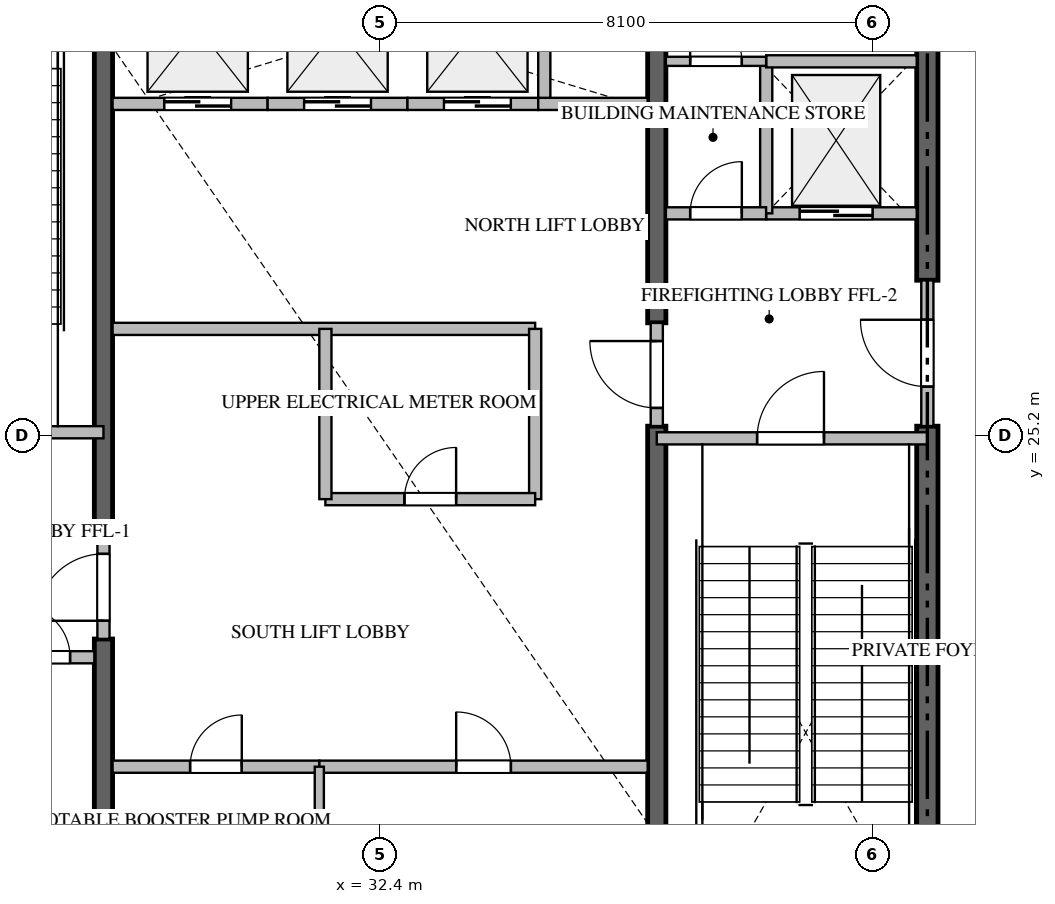
"""IFC4 building model, lengths in metres.
Left out: names, types, materials, properties, quantities, classifications, styles, units other than length and angle.
Written with IfcOpenShell. Run it as: python <this file> out.ifc"""

import sys

from ifc_helpers import new_model, si_unit, direction, frame, frame_2d, origin, place, context, subcontext, project, spatial, rectangle, extrude, source, transform, mapped, element, fill, save


model = new_model("IFC4")
c1 = context("Model", 3, precision=1e-05, world=origin(), true_north=direction((0.0, 1.0)))
c2 = subcontext(c1, "Body", "Model", "MODEL_VIEW")
j1 = project(units=[si_unit("LENGTHUNIT", "METRE"), si_unit("PLANEANGLEUNIT", "RADIAN")], contexts=[c1])
p1 = place(None, origin())
s1 = spatial("IfcSite", under=j1, at=p1, CompositionType="ELEMENT")
p2 = place(p1, origin())
s2 = spatial("IfcBuilding", under=s1, at=p2, CompositionType="ELEMENT")
p3 = place(p2, frame((0.0, 0.0, 342.05)))
s3 = spatial("IfcBuildingStorey", under=s2, at=p3, CompositionType="ELEMENT", Elevation=342.05)
p4 = place(p3, frame((41.4, 16.975, -0.26), z_axis=(0.0, 0.0, 1.0), x_axis=(0.0, 1.0, 0.0)))
e1 = element("IfcWall", 1, at=p4, inside=s3, PredefinedType="SHEAR", context=c2, shape_type="SweptSolid", body=[
    extrude(rectangle(XDim=8.375, YDim=0.35, at=frame_2d((4.188, 0.0))), origin(), (0.0, 0.0, 1.0), 5.898),
])
p5 = place(p3, frame((41.4, 27.75, -0.26), z_axis=(0.0, 0.0, 1.0), x_axis=(0.0, 1.0, 0.0)))
e2 = element("IfcWall", 2, at=p5, inside=s3, PredefinedType="SHEAR", context=c2, shape_type="SweptSolid", body=[
    extrude(rectangle(XDim=5.675, YDim=0.35, at=frame_2d((2.837, 0.0))), origin(), (0.0, 0.0, 1.0), 5.898),
])
p6 = place(p3, frame((27.85, 16.975, -0.26), z_axis=(0.0, 0.0, 1.0), x_axis=(0.0, 1.0, 0.0)))
e3 = element("IfcWall", 3, at=p6, inside=s3, PredefinedType="SHEAR", context=c2, shape_type="SweptSolid", body=[
    extrude(rectangle(XDim=4.875, YDim=0.3, at=frame_2d((2.438, 0.0))), origin(), (0.0, 0.0, 1.0), 5.898),
])
p7 = place(p3, frame((27.85, 23.55, -0.26), z_axis=(0.0, 0.0, 1.0), x_axis=(0.0, 1.0, 0.0)))
e4 = element("IfcWall", 4, at=p7, inside=s3, PredefinedType="SHEAR", context=c2, shape_type="SweptSolid", body=[
    extrude(rectangle(XDim=9.875, YDim=0.3, at=frame_2d((4.938, 0.0))), origin(), (0.0, 0.0, 1.0), 5.898),
])
p8 = place(p3, frame((36.95, 16.975, -0.26), z_axis=(0.0, 0.0, 1.0), x_axis=(0.0, 1.0, 0.0)))
e5 = element("IfcWall", 5, at=p8, inside=s3, PredefinedType="SHEAR", context=c2, shape_type="SweptSolid", body=[
    extrude(rectangle(XDim=8.375, YDim=0.3, at=frame_2d((4.188, 0.0))), origin(), (0.0, 0.0, 1.0), 5.898),
])
p9 = place(p3, frame((36.95, 27.05, -0.26), z_axis=(0.0, 0.0, 1.0), x_axis=(0.0, 1.0, 0.0)))
e6 = element("IfcWall", 6, at=p9, inside=s3, PredefinedType="SHEAR", context=c2, shape_type="SweptSolid", body=[
    extrude(rectangle(XDim=6.375, YDim=0.3, at=frame_2d((3.188, 0.0))), origin(), (0.0, 0.0, 1.0), 5.898),
])
p10 = place(p3, frame((23.4, 25.25, 0.0), z_axis=(0.0, 0.0, 1.0), x_axis=(1.0, 0.0, 0.0)))
e7 = element("IfcWall", 7, at=p10, inside=s3, PredefinedType="STANDARD", context=c2, shape_type="SweptSolid", body=[
    extrude(rectangle(XDim=4.45, YDim=0.2, at=frame_2d((2.225, 0.0))), origin(), (0.0, 0.0, 1.0), 5.64),
])
p11 = place(p10, frame((1.65, 0.0, 0.0)))
e8 = element("IfcOpeningElement", 8, at=p11, cuts=e7, PredefinedType="OPENING", context=c2, shape_type="SweptSolid", body=[
    extrude(rectangle(XDim=1.1, YDim=2.15, at=frame_2d((0.55, 1.075))), frame((0.0, 0.11, 0.0), z_axis=(0.0, -1.0, 0.0), x_axis=(1.0, 0.0, 0.0)), (0.0, 0.0, 1.0), 0.22),
])
p12 = place(p3, frame((36.95, 25.15, 0.0), z_axis=(0.0, 0.0, 1.0), x_axis=(1.0, 0.0, 0.0)))
e9 = element("IfcWall", 9, at=p12, inside=s3, PredefinedType="STANDARD", context=c2, shape_type="SweptSolid", body=[
    extrude(rectangle(XDim=4.45, YDim=0.2, at=frame_2d((2.225, 0.0))), origin(), (0.0, 0.0, 1.0), 5.64),
])
p13 = place(p12, frame((1.65, 0.0, 0.0)))
e10 = element("IfcOpeningElement", 10, at=p13, cuts=e9, PredefinedType="OPENING", context=c2, shape_type="SweptSolid", body=[
    extrude(rectangle(XDim=1.1, YDim=2.15, at=frame_2d((0.55, 1.075))), frame((0.0, 0.11, 0.0), z_axis=(0.0, -1.0, 0.0), x_axis=(1.0, 0.0, 0.0)), (0.0, 0.0, 1.0), 0.22),
])
p14 = place(p3, frame((38.75, 28.85, 0.0), z_axis=(0.0, 0.0, 1.0), x_axis=(1.0, 0.0, 0.0)))
e11 = element("IfcWall", 11, at=p14, inside=s3, PredefinedType="STANDARD", context=c2, shape_type="SweptSolid", body=[
    extrude(rectangle(XDim=2.475, YDim=0.2, at=frame_2d((1.238, 0.0))), origin(), (0.0, 0.0, 1.0), 5.64),
])
p15 = place(p14, frame((0.55, 0.0, 0.0)))
e12 = element("IfcOpeningElement", 12, at=p15, cuts=e11, PredefinedType="OPENING", context=c2, shape_type="SweptSolid", body=[
    extrude(rectangle(XDim=1.2, YDim=2.2, at=frame_2d((0.6, 1.1))), frame((0.0, 0.11, 0.0), z_axis=(0.0, -1.0, 0.0), x_axis=(1.0, 0.0, 0.0)), (0.0, 0.0, 1.0), 0.22),
])
p16 = place(p3, frame((28.0, 30.65, 0.0), z_axis=(0.0, 0.0, 1.0), x_axis=(1.0, 0.0, 0.0)))
e13 = element("IfcWall", 13, at=p16, inside=s3, PredefinedType="STANDARD", context=c2, shape_type="SweptSolid", body=[
    extrude(rectangle(XDim=2.55, YDim=0.2, at=frame_2d((1.275, 0.0))), origin(), (0.0, 0.0, 1.0), 5.64),
])
p17 = place(p16, frame((0.85, 0.0, 0.0)))
e14 = element("IfcOpeningElement", 14, at=p17, cuts=e13, PredefinedType="OPENING", context=c2, shape_type="SweptSolid", body=[
    extrude(rectangle(XDim=1.1, YDim=2.2, at=frame_2d((0.55, 1.1))), frame((0.0, 0.11, 0.0), z_axis=(0.0, -1.0, 0.0), x_axis=(1.0, 0.0, 0.0)), (0.0, 0.0, 1.0), 0.22),
])
p18 = place(p3, frame((30.55, 30.65, 0.0), z_axis=(0.0, 0.0, 1.0), x_axis=(1.0, 0.0, 0.0)))
e15 = element("IfcWall", 15, at=p18, inside=s3, PredefinedType="STANDARD", context=c2, shape_type="SweptSolid", body=[
    extrude(rectangle(XDim=2.3, YDim=0.2, at=frame_2d((1.15, 0.0))), origin(), (0.0, 0.0, 1.0), 5.64),
])
p19 = place(p18, frame((0.6, 0.0, 0.0)))
e16 = element("IfcOpeningElement", 16, at=p19, cuts=e15, PredefinedType="OPENING", context=c2, shape_type="SweptSolid", body=[
    extrude(rectangle(XDim=1.1, YDim=2.2, at=frame_2d((0.55, 1.1))), frame((0.0, 0.11, 0.0), z_axis=(0.0, -1.0, 0.0), x_axis=(1.0, 0.0, 0.0)), (0.0, 0.0, 1.0), 0.22),
])
p20 = place(p3, frame((32.85, 30.65, 0.0), z_axis=(0.0, 0.0, 1.0), x_axis=(1.0, 0.0, 0.0)))
e17 = element("IfcWall", 17, at=p20, inside=s3, PredefinedType="STANDARD", context=c2, shape_type="SweptSolid", body=[
    extrude(rectangle(XDim=2.15, YDim=0.2, at=frame_2d((1.075, 0.0))), origin(), (0.0, 0.0, 1.0), 5.64),
])
p21 = place(p20, frame((0.6, 0.0, 0.0)))
e18 = element("IfcOpeningElement", 18, at=p21, cuts=e17, PredefinedType="OPENING", context=c2, shape_type="SweptSolid", body=[
    extrude(rectangle(XDim=1.1, YDim=2.2, at=frame_2d((0.55, 1.1))), frame((0.0, 0.11, 0.0), z_axis=(0.0, -1.0, 0.0), x_axis=(1.0, 0.0, 0.0)), (0.0, 0.0, 1.0), 0.22),
])
p22 = place(p3, frame((35.0, 30.65, 0.0), z_axis=(0.0, 0.0, 1.0), x_axis=(1.0, 0.0, 0.0)))
e19 = element("IfcWall", 19, at=p22, inside=s3, PredefinedType="STANDARD", context=c2, shape_type="SweptSolid", body=[
    extrude(rectangle(XDim=1.8, YDim=0.2, at=frame_2d((0.9, 0.0))), origin(), (0.0, 0.0, 1.0), 5.64),
])
p23 = place(p3, frame((35.1, 30.75, 0.0), z_axis=(0.0, 0.0, 1.0), x_axis=(0.0, 1.0, 0.0)))
e20 = element("IfcWall", 20, at=p23, inside=s3, PredefinedType="STANDARD", context=c2, shape_type="SweptSolid", body=[
    extrude(rectangle(XDim=2.675, YDim=0.2, at=frame_2d((1.337, 0.0))), origin(), (0.0, 0.0, 1.0), 5.64),
])
p24 = place(p3, frame((26.052, 21.55, 0.0), z_axis=(0.0, 0.0, 1.0), x_axis=(1.0, 0.0, 0.0)))
e21 = element("IfcWall", 21, at=p24, inside=s3, PredefinedType="STANDARD", context=c2, shape_type="SweptSolid", body=[
    extrude(rectangle(XDim=1.648, YDim=0.2, at=frame_2d((0.824, 0.0))), origin(), (0.0, 0.0, 1.0), 5.64),
])
p25 = place(p24, frame((0.399, 0.0, 0.0)))
e22 = element("IfcOpeningElement", 22, at=p25, cuts=e21, PredefinedType="OPENING", context=c2, shape_type="SweptSolid", body=[
    extrude(rectangle(XDim=0.85, YDim=2.1, at=frame_2d((0.425, 1.05))), frame((0.0, 0.11, 0.0), z_axis=(0.0, -1.0, 0.0), x_axis=(1.0, 0.0, 0.0)), (0.0, 0.0, 1.0), 0.22),
])
p26 = place(p3, frame((38.75, 28.85, 0.0), z_axis=(0.0, 0.0, 1.0), x_axis=(0.0, 1.0, 0.0)))
e23 = element("IfcWall", 23, at=p26, inside=s3, PredefinedType="STANDARD", context=c2, shape_type="SweptSolid", body=[
    extrude(rectangle(XDim=2.5, YDim=0.2, at=frame_2d((1.25, 0.0))), origin(), (0.0, 0.0, 1.0), 5.64),
])
p27 = place(p3, frame((38.75, 31.35, 0.0), z_axis=(0.0, 0.0, 1.0), x_axis=(1.0, 0.0, 0.0)))
e24 = element("IfcWall", 24, at=p27, inside=s3, PredefinedType="STANDARD", context=c2, shape_type="SweptSolid", body=[
    extrude(rectangle(XDim=2.475, YDim=0.2, at=frame_2d((1.238, 0.0))), origin(), (0.0, 0.0, 1.0), 5.64),
])
p28 = place(p3, frame((37.1, 28.85, 0.0), z_axis=(0.0, 0.0, 1.0), x_axis=(1.0, 0.0, 0.0)))
e25 = element("IfcWall", 25, at=p28, inside=s3, PredefinedType="STANDARD", context=c2, shape_type="SweptSolid", body=[
    extrude(rectangle(XDim=1.648, YDim=0.2, at=frame_2d((0.824, 0.0))), origin(), (0.0, 0.0, 1.0), 5.64),
])
p29 = place(p28, frame((0.399, 0.0, 0.0)))
e26 = element("IfcOpeningElement", 26, at=p29, cuts=e25, PredefinedType="OPENING", context=c2, shape_type="SweptSolid", body=[
    extrude(rectangle(XDim=0.85, YDim=2.1, at=frame_2d((0.425, 1.05))), frame((0.0, 0.11, 0.0), z_axis=(0.0, -1.0, 0.0), x_axis=(1.0, 0.0, 0.0)), (0.0, 0.0, 1.0), 0.22),
])
p30 = place(p3, frame((41.4, 25.352, 0.0), z_axis=(0.0, 0.0, 1.0), x_axis=(0.0, 1.0, 0.0)))
e27 = element("IfcWall", 27, at=p30, inside=s3, PredefinedType="STANDARD", context=c2, shape_type="SweptSolid", body=[
    extrude(rectangle(XDim=2.396, YDim=0.2, at=frame_2d((1.198, 0.0))), origin(), (0.0, 0.0, 1.0), 5.64),
])
p31 = place(p30, frame((0.648, 0.0, 0.0)))
e28 = element("IfcOpeningElement", 28, at=p31, cuts=e27, PredefinedType="OPENING", context=c2, shape_type="SweptSolid", body=[
    extrude(rectangle(XDim=1.1, YDim=2.15, at=frame_2d((0.55, 1.075))), frame((0.0, 0.11, 0.0), z_axis=(0.0, -1.0, 0.0), x_axis=(1.0, 0.0, 0.0)), (0.0, 0.0, 1.0), 0.22),
])
p32 = place(p3, frame((27.85, 21.852, 0.0), z_axis=(0.0, 0.0, 1.0), x_axis=(0.0, 1.0, 0.0)))
e29 = element("IfcWall", 29, at=p32, inside=s3, PredefinedType="STANDARD", context=c2, shape_type="SweptSolid", body=[
    extrude(rectangle(XDim=1.696, YDim=0.2, at=frame_2d((0.848, 0.0))), origin(), (0.0, 0.0, 1.0), 5.64),
])
p33 = place(p32, frame((0.298, 0.0, 0.0)))
e30 = element("IfcOpeningElement", 30, at=p33, cuts=e29, PredefinedType="OPENING", context=c2, shape_type="SweptSolid", body=[
    extrude(rectangle(XDim=1.1, YDim=2.15, at=frame_2d((0.55, 1.075))), frame((0.0, 0.11, 0.0), z_axis=(0.0, -1.0, 0.0), x_axis=(1.0, 0.0, 0.0)), (0.0, 0.0, 1.0), 0.22),
])
p34 = place(p3, frame((36.95, 25.352, 0.0), z_axis=(0.0, 0.0, 1.0), x_axis=(0.0, 1.0, 0.0)))
e31 = element("IfcWall", 31, at=p34, inside=s3, PredefinedType="STANDARD", context=c2, shape_type="SweptSolid", body=[
    extrude(rectangle(XDim=1.696, YDim=0.2, at=frame_2d((0.848, 0.0))), origin(), (0.0, 0.0, 1.0), 5.64),
])
p35 = place(p34, frame((0.298, 0.0, 0.0)))
e32 = element("IfcOpeningElement", 32, at=p35, cuts=e31, PredefinedType="OPENING", context=c2, shape_type="SweptSolid", body=[
    extrude(rectangle(XDim=1.1, YDim=2.15, at=frame_2d((0.55, 1.075))), frame((0.0, 0.11, 0.0), z_axis=(0.0, -1.0, 0.0), x_axis=(1.0, 0.0, 0.0)), (0.0, 0.0, 1.0), 0.22),
])
p36 = place(p3, frame((37.1, 31.35, 0.0), z_axis=(0.0, 0.0, 1.0), x_axis=(1.0, 0.0, 0.0)))
e33 = element("IfcWall", 33, at=p36, inside=s3, PredefinedType="PARTITIONING", context=c2, shape_type="SweptSolid", body=[
    extrude(rectangle(XDim=1.648, YDim=0.15, at=frame_2d((0.824, 0.0))), origin(), (0.0, 0.0, 1.0), 5.64),
])
p37 = place(p36, frame((0.399, 0.0, 0.0)))
e34 = element("IfcOpeningElement", 34, at=p37, cuts=e33, PredefinedType="OPENING", context=c2, shape_type="SweptSolid", body=[
    extrude(rectangle(XDim=0.85, YDim=2.1, at=frame_2d((0.425, 1.05))), frame((0.0, 0.085, 0.0), z_axis=(0.0, -1.0, 0.0), x_axis=(1.0, 0.0, 0.0)), (0.0, 0.0, 1.0), 0.17),
])
p38 = place(p3, frame((28.0, 19.75, 0.0), z_axis=(0.0, 0.0, 1.0), x_axis=(1.0, 0.0, 0.0)))
e35 = element("IfcWall", 35, at=p38, inside=s3, PredefinedType="STANDARD", context=c2, shape_type="SweptSolid", body=[
    extrude(rectangle(XDim=3.4, YDim=0.2, at=frame_2d((1.7, 0.0))), origin(), (0.0, 0.0, 1.0), 5.64),
])
p39 = place(p38, frame((1.275, 0.0, 0.0)))
e36 = element("IfcOpeningElement", 36, at=p39, cuts=e35, PredefinedType="OPENING", context=c2, shape_type="SweptSolid", body=[
    extrude(rectangle(XDim=0.85, YDim=2.1, at=frame_2d((0.425, 1.05))), frame((0.0, 0.11, 0.0), z_axis=(0.0, -1.0, 0.0), x_axis=(1.0, 0.0, 0.0)), (0.0, 0.0, 1.0), 0.22),
])
p40 = place(p3, frame((31.402, 19.75, 0.0), z_axis=(0.0, 0.0, 1.0), x_axis=(1.0, 0.0, 0.0)))
e37 = element("IfcWall", 37, at=p40, inside=s3, PredefinedType="STANDARD", context=c2, shape_type="SweptSolid", body=[
    extrude(rectangle(XDim=5.398, YDim=0.2, at=frame_2d((2.699, 0.0))), origin(), (0.0, 0.0, 1.0), 5.64),
])
p41 = place(p40, frame((2.249, 0.0, 0.0)))
e38 = element("IfcOpeningElement", 38, at=p41, cuts=e37, PredefinedType="OPENING", context=c2, shape_type="SweptSolid", body=[
    extrude(rectangle(XDim=0.9, YDim=2.1, at=frame_2d((0.45, 1.05))), frame((0.0, 0.11, 0.0), z_axis=(0.0, -1.0, 0.0), x_axis=(1.0, 0.0, 0.0)), (0.0, 0.0, 1.0), 0.22),
])
p42 = place(p3, frame((31.4, 17.02, 0.0), z_axis=(0.0, 0.0, 1.0), x_axis=(0.0, 1.0, 0.0)))
e39 = element("IfcWall", 39, at=p42, inside=s3, PredefinedType="PARTITIONING", context=c2, shape_type="SweptSolid", body=[
    extrude(rectangle(XDim=2.73, YDim=0.15, at=frame_2d((1.365, 0.0))), origin(), (0.0, 0.0, 1.0), 5.64),
])
p43 = place(p3, frame((28.0, 26.95, 0.0), z_axis=(0.0, 0.0, 1.0), x_axis=(1.0, 0.0, 0.0)))
e40 = element("IfcWall", 40, at=p43, inside=s3, PredefinedType="STANDARD", context=c2, shape_type="SweptSolid", body=[
    extrude(rectangle(XDim=6.95, YDim=0.2, at=frame_2d((3.475, 0.0))), origin(), (0.0, 0.0, 1.0), 5.64),
])
p44 = place(p3, frame((34.95, 24.15, 0.0), z_axis=(0.0, 0.0, 1.0), x_axis=(0.0, 1.0, 0.0)))
e41 = element("IfcWall", 41, at=p44, inside=s3, PredefinedType="STANDARD", context=c2, shape_type="SweptSolid", body=[
    extrude(rectangle(XDim=2.8, YDim=0.2, at=frame_2d((1.4, 0.0))), origin(), (0.0, 0.0, 1.0), 5.64),
])
p45 = place(p3, frame((31.5, 24.15, 0.0), z_axis=(0.0, 0.0, 1.0), x_axis=(1.0, 0.0, 0.0)))
e42 = element("IfcWall", 42, at=p45, inside=s3, PredefinedType="STANDARD", context=c2, shape_type="SweptSolid", body=[
    extrude(rectangle(XDim=3.45, YDim=0.2, at=frame_2d((1.725, 0.0))), origin(), (0.0, 0.0, 1.0), 5.64),
])
p46 = place(p45, frame((1.3, 0.0, 0.0)))
e43 = element("IfcOpeningElement", 43, at=p46, cuts=e42, PredefinedType="OPENING", context=c2, shape_type="SweptSolid", body=[
    extrude(rectangle(XDim=0.85, YDim=2.1, at=frame_2d((0.425, 1.05))), frame((0.0, 0.11, 0.0), z_axis=(0.0, -1.0, 0.0), x_axis=(1.0, 0.0, 0.0)), (0.0, 0.0, 1.0), 0.22),
])
p47 = place(p3, frame((31.5, 24.15, 0.0), z_axis=(0.0, 0.0, 1.0), x_axis=(0.0, 1.0, 0.0)))
e44 = element("IfcWall", 44, at=p47, inside=s3, PredefinedType="STANDARD", context=c2, shape_type="SweptSolid", body=[
    extrude(rectangle(XDim=2.8, YDim=0.2, at=frame_2d((1.4, 0.0))), origin(), (0.0, 0.0, 1.0), 5.64),
])
m1 = source(origin(), c2, "Body", "SweptSolid", [
    extrude(rectangle(XDim=1.1, YDim=2.15, at=frame_2d((0.55, 1.075))), frame((0.0, 0.025, 0.0), z_axis=(0.0, -1.0, 0.0), x_axis=(1.0, 0.0, 0.0)), (0.0, 0.0, 1.0), 0.05),
])
p48 = place(p13, origin())
e45 = element("IfcDoor", 45, at=p48, inside=s3, OperationType="SINGLE_SWING_RIGHT", PredefinedType="DOOR", context=c2, shape_type="MappedRepresentation", body=[
    mapped(m1, transform((0.0, 0.0, 0.0), scale=1.0)),
])
fill(e10, e45)
m2 = source(origin(), c2, "Body", "SweptSolid", [
    extrude(rectangle(XDim=1.2, YDim=2.2, at=frame_2d((0.6, 1.1))), frame((0.0, 0.025, 0.0), z_axis=(0.0, -1.0, 0.0), x_axis=(1.0, 0.0, 0.0)), (0.0, 0.0, 1.0), 0.05),
])
p49 = place(p15, origin())
e46 = element("IfcDoor", 46, at=p49, inside=s3, OperationType="DOUBLE_DOOR_SLIDING", PredefinedType="DOOR", context=c2, shape_type="MappedRepresentation", body=[
    mapped(m2, transform((0.0, 0.0, 0.0), scale=1.0)),
])
fill(e12, e46)
m3 = source(origin(), c2, "Body", "SweptSolid", [
    extrude(rectangle(XDim=1.1, YDim=2.2, at=frame_2d((0.55, 1.1))), frame((0.0, 0.025, 0.0), z_axis=(0.0, -1.0, 0.0), x_axis=(1.0, 0.0, 0.0)), (0.0, 0.0, 1.0), 0.05),
])
p50 = place(p17, origin())
e47 = element("IfcDoor", 47, at=p50, inside=s3, OperationType="DOUBLE_DOOR_SLIDING", PredefinedType="DOOR", context=c2, shape_type="MappedRepresentation", body=[
    mapped(m3, transform((0.0, 0.0, 0.0), scale=1.0)),
])
fill(e14, e47)
p51 = place(p19, origin())
e48 = element("IfcDoor", 48, at=p51, inside=s3, OperationType="DOUBLE_DOOR_SLIDING", PredefinedType="DOOR", context=c2, shape_type="MappedRepresentation", body=[
    mapped(m3, transform((0.0, 0.0, 0.0), scale=1.0)),
])
fill(e16, e48)
p52 = place(p21, origin())
e49 = element("IfcDoor", 49, at=p52, inside=s3, OperationType="DOUBLE_DOOR_SLIDING", PredefinedType="DOOR", context=c2, shape_type="MappedRepresentation", body=[
    mapped(m3, transform((0.0, 0.0, 0.0), scale=1.0)),
])
fill(e18, e49)
m4 = source(origin(), c2, "Body", "SweptSolid", [
    extrude(rectangle(XDim=0.85, YDim=2.1, at=frame_2d((0.425, 1.05))), frame((0.0, 0.025, 0.0), z_axis=(0.0, -1.0, 0.0), x_axis=(1.0, 0.0, 0.0)), (0.0, 0.0, 1.0), 0.05),
])
p53 = place(p25, origin())
e50 = element("IfcDoor", 50, at=p53, inside=s3, OperationType="SINGLE_SWING_LEFT", PredefinedType="DOOR", context=c2, shape_type="MappedRepresentation", body=[
    mapped(m4, transform((0.0, 0.0, 0.0), scale=1.0)),
])
fill(e22, e50)
p54 = place(p29, origin())
e51 = element("IfcDoor", 51, at=p54, inside=s3, OperationType="SINGLE_SWING_RIGHT", PredefinedType="DOOR", context=c2, shape_type="MappedRepresentation", body=[
    mapped(m4, transform((0.0, 0.0, 0.0), scale=1.0)),
])
fill(e26, e51)
p55 = place(p31, origin())
e52 = element("IfcDoor", 52, at=p55, inside=s3, OperationType="SINGLE_SWING_RIGHT", PredefinedType="DOOR", context=c2, shape_type="MappedRepresentation", body=[
    mapped(m1, transform((0.0, 0.0, 0.0), scale=1.0)),
])
fill(e28, e52)
p56 = place(p33, origin())
e53 = element("IfcDoor", 53, at=p56, inside=s3, OperationType="SINGLE_SWING_LEFT", PredefinedType="DOOR", context=c2, shape_type="MappedRepresentation", body=[
    mapped(m1, transform((0.0, 0.0, 0.0), scale=1.0)),
])
fill(e30, e53)
p57 = place(p35, origin())
e54 = element("IfcDoor", 54, at=p57, inside=s3, OperationType="SINGLE_SWING_RIGHT", PredefinedType="DOOR", context=c2, shape_type="MappedRepresentation", body=[
    mapped(m1, transform((0.0, 0.0, 0.0), scale=1.0)),
])
fill(e32, e54)
p58 = place(p37, origin())
e55 = element("IfcDoor", 55, at=p58, inside=s3, OperationType="SINGLE_SWING_LEFT", PredefinedType="DOOR", context=c2, shape_type="MappedRepresentation", body=[
    mapped(m4, transform((0.0, 0.0, 0.0), scale=1.0)),
])
fill(e34, e55)
p59 = place(p39, origin())
e56 = element("IfcDoor", 56, at=p59, inside=s3, OperationType="SINGLE_SWING_RIGHT", PredefinedType="DOOR", context=c2, shape_type="MappedRepresentation", body=[
    mapped(m4, transform((0.0, 0.0, 0.0), scale=1.0)),
])
fill(e36, e56)
m5 = source(origin(), c2, "Body", "SweptSolid", [
    extrude(rectangle(XDim=0.9, YDim=2.1, at=frame_2d((0.45, 1.05))), frame((0.0, 0.025, 0.0), z_axis=(0.0, -1.0, 0.0), x_axis=(1.0, 0.0, 0.0)), (0.0, 0.0, 1.0), 0.05),
])
p60 = place(p41, origin())
e57 = element("IfcDoor", 57, at=p60, inside=s3, OperationType="SINGLE_SWING_LEFT", PredefinedType="DOOR", context=c2, shape_type="MappedRepresentation", body=[
    mapped(m5, transform((0.0, 0.0, 0.0), scale=1.0)),
])
fill(e38, e57)
p61 = place(p46, origin())
e58 = element("IfcDoor", 58, at=p61, inside=s3, OperationType="SINGLE_SWING_RIGHT", PredefinedType="DOOR", context=c2, shape_type="MappedRepresentation", body=[
    mapped(m4, transform((0.0, 0.0, 0.0), scale=1.0)),
])
fill(e43, e58)
save(model, sys.argv[1])
